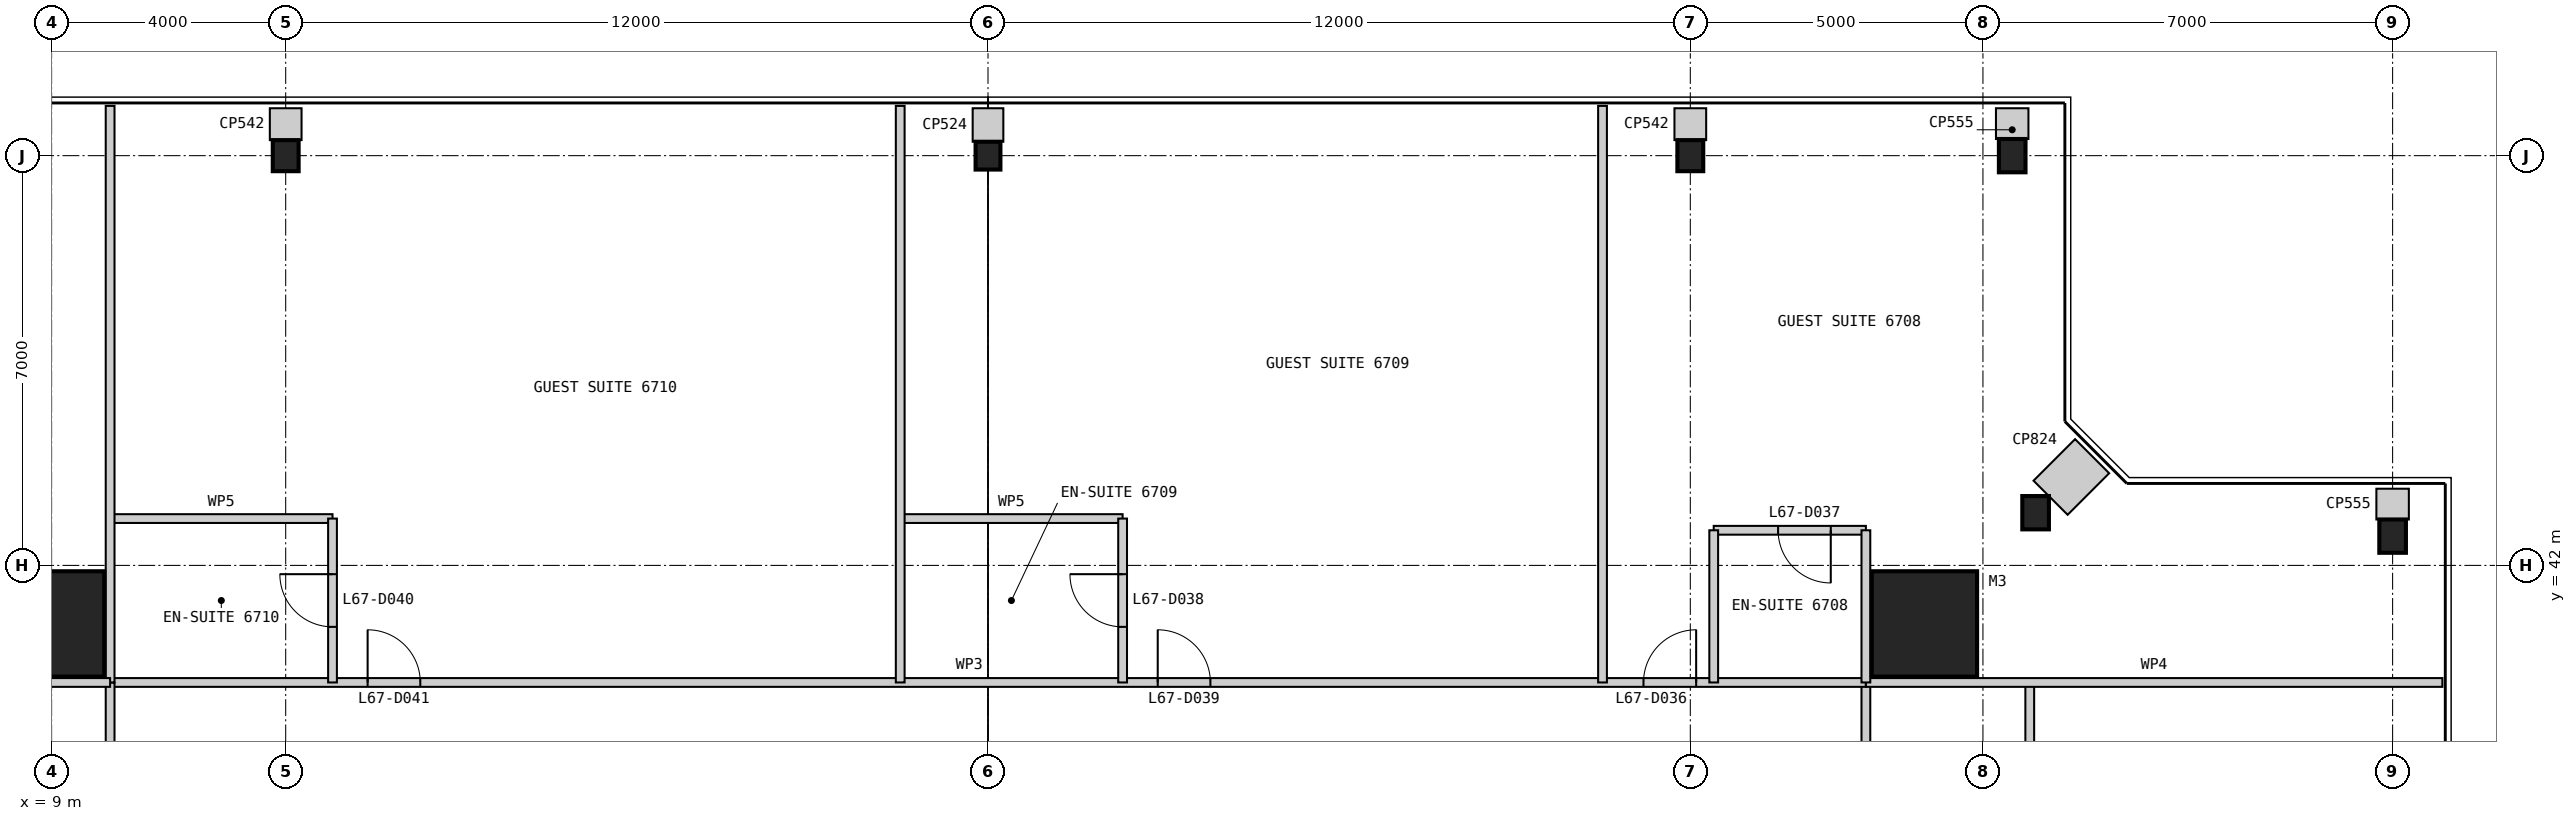
"""IFC4 building model, lengths in metres.
Left out: names, types, materials, properties, quantities, classifications, styles, units other than length and angle.
Written with IfcOpenShell. Run it as: python <this file> out.ifc"""

import sys

from ifc_helpers import new_model, si_unit, direction, frame, frame_2d, origin, origin_2d, place, context, subcontext, project, spatial, rectangle, i_section, extrude, element, fill, save


model = new_model("IFC4")
c1 = context("Model", 3, precision=1e-05, world=origin(), true_north=direction((0.0, 1.0)))
c2 = subcontext(c1, "Body", "Model", "MODEL_VIEW")
j1 = project(units=[si_unit("LENGTHUNIT", "METRE"), si_unit("PLANEANGLEUNIT", "RADIAN")], contexts=[c1])
p1 = place(None, origin())
s1 = spatial("IfcSite", under=j1, at=p1, CompositionType="ELEMENT")
p2 = place(p1, origin())
s2 = spatial("IfcBuilding", under=s1, at=p2, CompositionType="ELEMENT")
p3 = place(p2, frame((0.0, 0.0, 279.8)))
s3 = spatial("IfcBuildingStorey", under=s2, at=p3, CompositionType="ELEMENT", Elevation=279.8)
for number, where, z_axis, x_axis in (
    (1, (41.0, 41.0, 0.0), (0.0, 0.0, 1.0), (1.0, 0.0, 0.0)),
    (2, (9.0, 41.0, 0.0), (0.0, 0.0, 1.0), (1.0, 0.0, 0.0)),
):
    element("IfcColumn", number, at=place(p3, frame(where, z_axis=z_axis, x_axis=x_axis)), inside=s3, PredefinedType="COLUMN", context=c2, shape_type="SweptSolid", body=[
        extrude(rectangle(XDim=1.8, YDim=1.8, at=origin_2d()), origin(), (0.0, 0.0, 1.0), 3.4),
    ])
for number, where, z_axis, x_axis in (
    (3, (49.0, 42.5, 0.0), (0.0, 0.0, 1.0), (1.0, 0.0, 0.0)),
    (4, (42.9, 42.9, 0.0), (0.0, 0.0, 1.0), (1.0, 0.0, 0.0)),
    (5, (42.5, 49.0, 0.0), (0.0, 0.0, 1.0), (1.0, 0.0, 0.0)),
):
    element("IfcColumn", number, at=place(p3, frame(where, z_axis=z_axis, x_axis=x_axis)), inside=s3, PredefinedType="COLUMN", context=c2, shape_type="SweptSolid", body=[
        extrude(i_section(OverallWidth=0.455, OverallDepth=0.569, WebThickness=0.078, FlangeThickness=0.125, at=origin_2d()), origin(), (0.0, 0.0, 1.0), 3.4),
    ])
p4 = place(p3, frame((37.0, 49.0, 0.0), z_axis=(0.0, 0.0, 1.0), x_axis=(1.0, 0.0, 0.0)))
e6 = element("IfcColumn", 6, at=p4, inside=s3, PredefinedType="COLUMN", context=c2, shape_type="SweptSolid", body=[
    extrude(i_section(OverallWidth=0.442, OverallDepth=0.531, WebThickness=0.066, FlangeThickness=0.106, at=origin_2d()), origin(), (0.0, 0.0, 1.0), 3.4),
])
p5 = place(p3, frame((25.0, 49.0, 0.0), z_axis=(0.0, 0.0, 1.0), x_axis=(1.0, 0.0, 0.0)))
e7 = element("IfcColumn", 7, at=p5, inside=s3, PredefinedType="COLUMN", context=c2, shape_type="SweptSolid", body=[
    extrude(i_section(OverallWidth=0.424, OverallDepth=0.475, WebThickness=0.048, FlangeThickness=0.077, at=origin_2d()), origin(), (0.0, 0.0, 1.0), 3.4),
])
p6 = place(p3, frame((13.0, 49.0, 0.0), z_axis=(0.0, 0.0, 1.0), x_axis=(1.0, 0.0, 0.0)))
e8 = element("IfcColumn", 8, at=p6, inside=s3, PredefinedType="COLUMN", context=c2, shape_type="SweptSolid", body=[
    extrude(i_section(OverallWidth=0.442, OverallDepth=0.531, WebThickness=0.066, FlangeThickness=0.106, at=origin_2d()), origin(), (0.0, 0.0, 1.0), 3.4),
])
p7 = place(p3, frame((40.0, 10.0, 0.0), z_axis=(0.0, 0.0, 1.0), x_axis=(0.0, 1.0, 0.0)))
e9 = element("IfcWall", 9, at=p7, inside=s3, PredefinedType="PARTITIONING", context=c2, shape_type="SweptSolid", body=[
    extrude(rectangle(XDim=30.0, YDim=0.15, at=frame_2d((15.0, 0.0))), origin(), (0.0, 0.0, 1.0), 2.638),
])
p8 = place(p7, frame((2.9, 0.0, 0.0)))
e10 = element("IfcOpeningElement", 10, at=p8, cuts=e9, PredefinedType="OPENING", context=c2, shape_type="SweptSolid", body=[
    extrude(rectangle(XDim=0.9, YDim=2.1, at=frame_2d((0.45, 1.05))), frame((0.0, 0.085, 0.0), z_axis=(0.0, -1.0, 0.0), x_axis=(1.0, 0.0, 0.0)), (0.0, 0.0, 1.0), 0.17),
])
p9 = place(p7, frame((11.2, 0.0, 0.0)))
e11 = element("IfcOpeningElement", 11, at=p9, cuts=e9, PredefinedType="OPENING", context=c2, shape_type="SweptSolid", body=[
    extrude(rectangle(XDim=0.9, YDim=2.1, at=frame_2d((0.45, 1.05))), frame((0.0, 0.085, 0.0), z_axis=(0.0, -1.0, 0.0), x_axis=(1.0, 0.0, 0.0)), (0.0, 0.0, 1.0), 0.17),
])
p10 = place(p7, frame((24.7, 0.0, 0.0)))
e12 = element("IfcOpeningElement", 12, at=p10, cuts=e9, PredefinedType="OPENING", context=c2, shape_type="SweptSolid", body=[
    extrude(rectangle(XDim=0.9, YDim=2.1, at=frame_2d((0.45, 1.05))), frame((0.0, 0.085, 0.0), z_axis=(0.0, -1.0, 0.0), x_axis=(1.0, 0.0, 0.0)), (0.0, 0.0, 1.0), 0.17),
])
p11 = place(p3, frame((42.8, 36.2, 0.0), z_axis=(0.0, 0.0, 1.0), x_axis=(0.0, 1.0, 0.0)))
e13 = element("IfcWall", 13, at=p11, inside=s3, PredefinedType="PARTITIONING", context=c2, shape_type="SweptSolid", body=[
    extrude(rectangle(XDim=3.8, YDim=0.15, at=frame_2d((1.9, 0.0))), origin(), (0.0, 0.0, 1.0), 3.25),
])
p12 = place(p3, frame((40.0, 40.0, 0.0), z_axis=(0.0, 0.0, 1.0), x_axis=(-1.0, 0.0, 0.0)))
e14 = element("IfcWall", 14, at=p12, inside=s3, PredefinedType="PARTITIONING", context=c2, shape_type="SweptSolid", body=[
    extrude(rectangle(XDim=30.0, YDim=0.15, at=frame_2d((15.0, 0.0))), origin(), (0.0, 0.0, 1.0), 3.25),
])
p13 = place(p12, frame((2.9, 0.0, 0.0)))
e15 = element("IfcOpeningElement", 15, at=p13, cuts=e14, PredefinedType="OPENING", context=c2, shape_type="SweptSolid", body=[
    extrude(rectangle(XDim=0.9, YDim=2.1, at=frame_2d((0.45, 1.05))), frame((0.0, 0.085, 0.0), z_axis=(0.0, -1.0, 0.0), x_axis=(1.0, 0.0, 0.0)), (0.0, 0.0, 1.0), 0.17),
])
p14 = place(p12, frame((11.2, 0.0, 0.0)))
e16 = element("IfcOpeningElement", 16, at=p14, cuts=e14, PredefinedType="OPENING", context=c2, shape_type="SweptSolid", body=[
    extrude(rectangle(XDim=0.9, YDim=2.1, at=frame_2d((0.45, 1.05))), frame((0.0, 0.085, 0.0), z_axis=(0.0, -1.0, 0.0), x_axis=(1.0, 0.0, 0.0)), (0.0, 0.0, 1.0), 0.17),
])
p15 = place(p12, frame((24.7, 0.0, 0.0)))
e17 = element("IfcOpeningElement", 17, at=p15, cuts=e14, PredefinedType="OPENING", context=c2, shape_type="SweptSolid", body=[
    extrude(rectangle(XDim=0.9, YDim=2.1, at=frame_2d((0.45, 1.05))), frame((0.0, 0.085, 0.0), z_axis=(0.0, -1.0, 0.0), x_axis=(1.0, 0.0, 0.0)), (0.0, 0.0, 1.0), 0.17),
])
p16 = place(p3, frame((49.85, 40.0, 0.0), z_axis=(0.0, 0.0, 1.0), x_axis=(-1.0, 0.0, 0.0)))
e18 = element("IfcWall", 18, at=p16, inside=s3, PredefinedType="PARTITIONING", context=c2, shape_type="SweptSolid", body=[
    extrude(rectangle(XDim=9.85, YDim=0.15, at=frame_2d((4.925, 0.0))), origin(), (0.0, 0.0, 1.0), 3.25),
])
p17 = place(p3, frame((40.0, 42.6, 0.0), z_axis=(0.0, 0.0, 1.0), x_axis=(-1.0, 0.0, 0.0)))
e19 = element("IfcWall", 19, at=p17, inside=s3, PredefinedType="PARTITIONING", context=c2, shape_type="SweptSolid", body=[
    extrude(rectangle(XDim=2.6, YDim=0.15, at=frame_2d((1.3, 0.0))), origin(), (0.0, 0.0, 1.0), 3.25),
])
p18 = place(p17, frame((0.6, 0.0, 0.0)))
e20 = element("IfcOpeningElement", 20, at=p18, cuts=e19, PredefinedType="OPENING", context=c2, shape_type="SweptSolid", body=[
    extrude(rectangle(XDim=0.9, YDim=2.1, at=frame_2d((0.45, 1.05))), frame((0.0, 0.085, 0.0), z_axis=(0.0, -1.0, 0.0), x_axis=(1.0, 0.0, 0.0)), (0.0, 0.0, 1.0), 0.17),
])
for number, where, z_axis, x_axis in (
    (21, (40.0, 42.6, 0.0), (0.0, 0.0, 1.0), (0.0, -1.0, 0.0)),
    (22, (37.4, 42.6, 0.0), (0.0, 0.0, 1.0), (0.0, -1.0, 0.0)),
):
    element("IfcWall", number, at=place(p3, frame(where, z_axis=z_axis, x_axis=x_axis)), inside=s3, PredefinedType="PARTITIONING", context=c2, shape_type="SweptSolid", body=[
        extrude(rectangle(XDim=2.6, YDim=0.15, at=frame_2d((1.3, 0.0))), origin(), (0.0, 0.0, 1.0), 3.25),
    ])
p19 = place(p3, frame((35.5, 49.85, 0.0), z_axis=(0.0, 0.0, 1.0), x_axis=(0.0, -1.0, 0.0)))
e23 = element("IfcWall", 23, at=p19, inside=s3, PredefinedType="PARTITIONING", context=c2, shape_type="SweptSolid", body=[
    extrude(rectangle(XDim=9.85, YDim=0.15, at=frame_2d((4.925, 0.0))), origin(), (0.0, 0.0, 1.0), 3.25),
])
p20 = place(p3, frame((27.3, 42.8, 0.0), z_axis=(0.0, 0.0, 1.0), x_axis=(-1.0, 0.0, 0.0)))
e24 = element("IfcWall", 24, at=p20, inside=s3, PredefinedType="PARTITIONING", context=c2, shape_type="SweptSolid", body=[
    extrude(rectangle(XDim=3.8, YDim=0.15, at=frame_2d((1.9, 0.0))), origin(), (0.0, 0.0, 1.0), 3.25),
])
p21 = place(p3, frame((27.3, 42.8, 0.0), z_axis=(0.0, 0.0, 1.0), x_axis=(0.0, -1.0, 0.0)))
e25 = element("IfcWall", 25, at=p21, inside=s3, PredefinedType="PARTITIONING", context=c2, shape_type="SweptSolid", body=[
    extrude(rectangle(XDim=2.8, YDim=0.15, at=frame_2d((1.4, 0.0))), origin(), (0.0, 0.0, 1.0), 3.25),
])
p22 = place(p21, frame((0.95, 0.0, 0.0)))
e26 = element("IfcOpeningElement", 26, at=p22, cuts=e25, PredefinedType="OPENING", context=c2, shape_type="SweptSolid", body=[
    extrude(rectangle(XDim=0.9, YDim=2.1, at=frame_2d((0.45, 1.05))), frame((0.0, 0.085, 0.0), z_axis=(0.0, -1.0, 0.0), x_axis=(1.0, 0.0, 0.0)), (0.0, 0.0, 1.0), 0.17),
])
p23 = place(p3, frame((23.5, 49.85, 0.0), z_axis=(0.0, 0.0, 1.0), x_axis=(0.0, -1.0, 0.0)))
e27 = element("IfcWall", 27, at=p23, inside=s3, PredefinedType="PARTITIONING", context=c2, shape_type="SweptSolid", body=[
    extrude(rectangle(XDim=9.85, YDim=0.15, at=frame_2d((4.925, 0.0))), origin(), (0.0, 0.0, 1.0), 3.25),
])
p24 = place(p3, frame((13.8, 42.8, 0.0), z_axis=(0.0, 0.0, 1.0), x_axis=(-1.0, 0.0, 0.0)))
e28 = element("IfcWall", 28, at=p24, inside=s3, PredefinedType="PARTITIONING", context=c2, shape_type="SweptSolid", body=[
    extrude(rectangle(XDim=3.8, YDim=0.15, at=frame_2d((1.9, 0.0))), origin(), (0.0, 0.0, 1.0), 3.25),
])
p25 = place(p3, frame((13.8, 42.8, 0.0), z_axis=(0.0, 0.0, 1.0), x_axis=(0.0, -1.0, 0.0)))
e29 = element("IfcWall", 29, at=p25, inside=s3, PredefinedType="PARTITIONING", context=c2, shape_type="SweptSolid", body=[
    extrude(rectangle(XDim=2.8, YDim=0.15, at=frame_2d((1.4, 0.0))), origin(), (0.0, 0.0, 1.0), 3.25),
])
p26 = place(p25, frame((0.95, 0.0, 0.0)))
e30 = element("IfcOpeningElement", 30, at=p26, cuts=e29, PredefinedType="OPENING", context=c2, shape_type="SweptSolid", body=[
    extrude(rectangle(XDim=0.9, YDim=2.1, at=frame_2d((0.45, 1.05))), frame((0.0, 0.085, 0.0), z_axis=(0.0, -1.0, 0.0), x_axis=(1.0, 0.0, 0.0)), (0.0, 0.0, 1.0), 0.17),
])
p27 = place(p3, frame((10.0, 40.0, 0.0), z_axis=(0.0, 0.0, 1.0), x_axis=(0.0, -1.0, 0.0)))
e31 = element("IfcWall", 31, at=p27, inside=s3, PredefinedType="PARTITIONING", context=c2, shape_type="SweptSolid", body=[
    extrude(rectangle(XDim=30.0, YDim=0.15, at=frame_2d((15.0, 0.0))), origin(), (0.0, 0.0, 1.0), 2.638),
])
p28 = place(p27, frame((2.9, 0.0, 0.0)))
e32 = element("IfcOpeningElement", 32, at=p28, cuts=e31, PredefinedType="OPENING", context=c2, shape_type="SweptSolid", body=[
    extrude(rectangle(XDim=0.9, YDim=2.1, at=frame_2d((0.45, 1.05))), frame((0.0, 0.085, 0.0), z_axis=(0.0, -1.0, 0.0), x_axis=(1.0, 0.0, 0.0)), (0.0, 0.0, 1.0), 0.17),
])
p29 = place(p27, frame((11.2, 0.0, 0.0)))
e33 = element("IfcOpeningElement", 33, at=p29, cuts=e31, PredefinedType="OPENING", context=c2, shape_type="SweptSolid", body=[
    extrude(rectangle(XDim=0.9, YDim=2.1, at=frame_2d((0.45, 1.05))), frame((0.0, 0.085, 0.0), z_axis=(0.0, -1.0, 0.0), x_axis=(1.0, 0.0, 0.0)), (0.0, 0.0, 1.0), 0.17),
])
p30 = place(p27, frame((24.7, 0.0, 0.0)))
e34 = element("IfcOpeningElement", 34, at=p30, cuts=e31, PredefinedType="OPENING", context=c2, shape_type="SweptSolid", body=[
    extrude(rectangle(XDim=0.9, YDim=2.1, at=frame_2d((0.45, 1.05))), frame((0.0, 0.085, 0.0), z_axis=(0.0, -1.0, 0.0), x_axis=(1.0, 0.0, 0.0)), (0.0, 0.0, 1.0), 0.17),
])
p31 = place(p3, frame((10.0, 49.85, 0.0), z_axis=(0.0, 0.0, 1.0), x_axis=(0.0, -1.0, 0.0)))
e35 = element("IfcWall", 35, at=p31, inside=s3, PredefinedType="PARTITIONING", context=c2, shape_type="SweptSolid", body=[
    extrude(rectangle(XDim=9.85, YDim=0.15, at=frame_2d((4.925, 0.0))), origin(), (0.0, 0.0, 1.0), 3.25),
])
p32 = place(p3, frame((7.4, 40.0, 0.0), z_axis=(0.0, 0.0, 1.0), x_axis=(1.0, 0.0, 0.0)))
e36 = element("IfcWall", 36, at=p32, inside=s3, PredefinedType="PARTITIONING", context=c2, shape_type="SweptSolid", body=[
    extrude(rectangle(XDim=2.6, YDim=0.15, at=frame_2d((1.3, 0.0))), origin(), (0.0, 0.0, 1.0), 3.25),
])
p33 = place(p3, frame((49.0, 43.31, 0.0), z_axis=(0.0, 0.0, 1.0), x_axis=(0.0, -1.0, 0.0)))
e37 = element("IfcWall", 37, at=p33, inside=s3, PredefinedType="PARTITIONING", context=c2, shape_type="SweptSolid", body=[
    extrude(rectangle(XDim=0.526, YDim=0.555, at=frame_2d((0.263, 0.0))), origin(), (0.0, 0.0, 1.0), 3.25),
])
p34 = place(p3, frame((43.866, 43.866, 0.0), z_axis=(0.0, 0.0, 1.0), x_axis=(-0.707106781187, -0.707106781187, 0.0)))
e38 = element("IfcWall", 38, at=p34, inside=s3, PredefinedType="PARTITIONING", context=c2, shape_type="SweptSolid", body=[
    extrude(rectangle(XDim=1.004, YDim=0.824, at=frame_2d((0.502, 0.0))), origin(), (0.0, 0.0, 1.0), 3.25),
])
p35 = place(p3, frame((42.5, 49.81, 0.0), z_axis=(0.0, 0.0, 1.0), x_axis=(0.0, -1.0, 0.0)))
e39 = element("IfcWall", 39, at=p35, inside=s3, PredefinedType="PARTITIONING", context=c2, shape_type="SweptSolid", body=[
    extrude(rectangle(XDim=0.526, YDim=0.555, at=frame_2d((0.263, 0.0))), origin(), (0.0, 0.0, 1.0), 3.25),
])
p36 = place(p3, frame((37.0, 49.81, 0.0), z_axis=(0.0, 0.0, 1.0), x_axis=(0.0, -1.0, 0.0)))
e40 = element("IfcWall", 40, at=p36, inside=s3, PredefinedType="PARTITIONING", context=c2, shape_type="SweptSolid", body=[
    extrude(rectangle(XDim=0.545, YDim=0.542, at=frame_2d((0.272, 0.0))), origin(), (0.0, 0.0, 1.0), 3.25),
])
p37 = place(p3, frame((25.0, 49.81, 0.0), z_axis=(0.0, 0.0, 1.0), x_axis=(0.0, -1.0, 0.0)))
e41 = element("IfcWall", 41, at=p37, inside=s3, PredefinedType="PARTITIONING", context=c2, shape_type="SweptSolid", body=[
    extrude(rectangle(XDim=0.573, YDim=0.524, at=frame_2d((0.286, 0.0))), origin(), (0.0, 0.0, 1.0), 3.25),
])
p38 = place(p3, frame((13.0, 49.81, 0.0), z_axis=(0.0, 0.0, 1.0), x_axis=(0.0, -1.0, 0.0)))
e42 = element("IfcWall", 42, at=p38, inside=s3, PredefinedType="PARTITIONING", context=c2, shape_type="SweptSolid", body=[
    extrude(rectangle(XDim=0.545, YDim=0.542, at=frame_2d((0.272, 0.0))), origin(), (0.0, 0.0, 1.0), 3.25),
])
p39 = place(p13, frame((0.9, 0.0, 0.0), z_axis=(0.0, 0.0, 1.0), x_axis=(-1.0, 0.0, 0.0)))
e43 = element("IfcDoor", 43, at=p39, inside=s3, OperationType="SINGLE_SWING_RIGHT", PredefinedType="DOOR", context=c2, shape_type="SweptSolid", body=[
    extrude(rectangle(XDim=0.9, YDim=2.1, at=frame_2d((0.45, 1.05))), frame((0.0, 0.025, 0.0), z_axis=(0.0, -1.0, 0.0), x_axis=(1.0, 0.0, 0.0)), (0.0, 0.0, 1.0), 0.05),
])
fill(e15, e43)
p40 = place(p18, origin())
e44 = element("IfcDoor", 44, at=p40, inside=s3, OperationType="SINGLE_SWING_LEFT", PredefinedType="DOOR", context=c2, shape_type="SweptSolid", body=[
    extrude(rectangle(XDim=0.9, YDim=2.1, at=frame_2d((0.45, 1.05))), frame((0.0, 0.025, 0.0), z_axis=(0.0, -1.0, 0.0), x_axis=(1.0, 0.0, 0.0)), (0.0, 0.0, 1.0), 0.05),
])
fill(e20, e44)
p41 = place(p22, frame((0.9, 0.0, 0.0), z_axis=(0.0, 0.0, 1.0), x_axis=(-1.0, 0.0, 0.0)))
e45 = element("IfcDoor", 45, at=p41, inside=s3, OperationType="SINGLE_SWING_RIGHT", PredefinedType="DOOR", context=c2, shape_type="SweptSolid", body=[
    extrude(rectangle(XDim=0.9, YDim=2.1, at=frame_2d((0.45, 1.05))), frame((0.0, 0.025, 0.0), z_axis=(0.0, -1.0, 0.0), x_axis=(1.0, 0.0, 0.0)), (0.0, 0.0, 1.0), 0.05),
])
fill(e26, e45)
p42 = place(p14, frame((0.9, 0.0, 0.0), z_axis=(0.0, 0.0, 1.0), x_axis=(-1.0, 0.0, 0.0)))
e46 = element("IfcDoor", 46, at=p42, inside=s3, OperationType="SINGLE_SWING_LEFT", PredefinedType="DOOR", context=c2, shape_type="SweptSolid", body=[
    extrude(rectangle(XDim=0.9, YDim=2.1, at=frame_2d((0.45, 1.05))), frame((0.0, 0.025, 0.0), z_axis=(0.0, -1.0, 0.0), x_axis=(1.0, 0.0, 0.0)), (0.0, 0.0, 1.0), 0.05),
])
fill(e16, e46)
p43 = place(p26, frame((0.9, 0.0, 0.0), z_axis=(0.0, 0.0, 1.0), x_axis=(-1.0, 0.0, 0.0)))
e47 = element("IfcDoor", 47, at=p43, inside=s3, OperationType="SINGLE_SWING_RIGHT", PredefinedType="DOOR", context=c2, shape_type="SweptSolid", body=[
    extrude(rectangle(XDim=0.9, YDim=2.1, at=frame_2d((0.45, 1.05))), frame((0.0, 0.025, 0.0), z_axis=(0.0, -1.0, 0.0), x_axis=(1.0, 0.0, 0.0)), (0.0, 0.0, 1.0), 0.05),
])
fill(e30, e47)
p44 = place(p15, frame((0.9, 0.0, 0.0), z_axis=(0.0, 0.0, 1.0), x_axis=(-1.0, 0.0, 0.0)))
e48 = element("IfcDoor", 48, at=p44, inside=s3, OperationType="SINGLE_SWING_LEFT", PredefinedType="DOOR", context=c2, shape_type="SweptSolid", body=[
    extrude(rectangle(XDim=0.9, YDim=2.1, at=frame_2d((0.45, 1.05))), frame((0.0, 0.025, 0.0), z_axis=(0.0, -1.0, 0.0), x_axis=(1.0, 0.0, 0.0)), (0.0, 0.0, 1.0), 0.05),
])
fill(e17, e48)
save(model, sys.argv[1])
